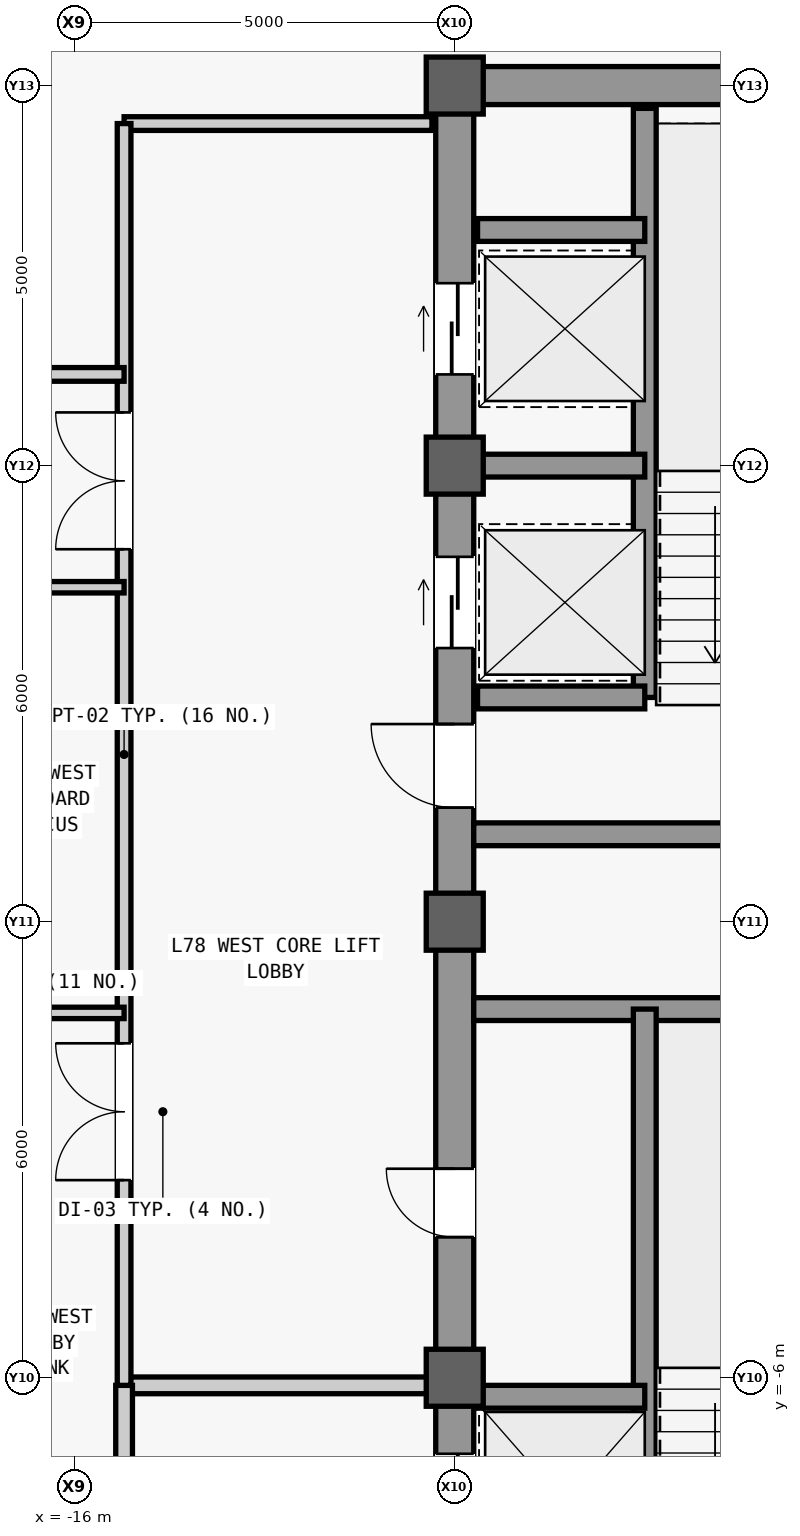
"""IFC4 building model, lengths in metres.
Left out: names, types, materials, properties, quantities, classifications, styles, units other than length and angle.
Written with IfcOpenShell. Run it as: python <this file> out.ifc"""

import sys

from ifc_helpers import new_model, si_unit, direction, frame, frame_2d, origin, origin_2d, place, context, subcontext, project, spatial, rectangle, extrude, source, transform, mapped, element, fill, save


model = new_model("IFC4")
c1 = context("Model", 3, precision=1e-05, world=origin(), true_north=direction((0.0, 1.0)))
c2 = subcontext(c1, "Body", "Model", "MODEL_VIEW")
j1 = project(units=[si_unit("LENGTHUNIT", "METRE"), si_unit("PLANEANGLEUNIT", "RADIAN")], contexts=[c1])
p1 = place(None, origin())
s1 = spatial("IfcSite", under=j1, at=p1, CompositionType="ELEMENT")
p2 = place(p1, origin())
s2 = spatial("IfcBuilding", under=s1, at=p2, CompositionType="ELEMENT")
p3 = place(p2, frame((0.0, 0.0, 330.3)))
s3 = spatial("IfcBuildingStorey", under=s2, at=p3, CompositionType="ELEMENT", Elevation=330.3)
m1 = source(origin(), c2, "Body", "SweptSolid", [
    extrude(rectangle(XDim=22.0, YDim=0.5, at=frame_2d((11.0, 0.0))), origin(), (0.0, 0.0, 1.0), 3.74),
])
p4 = place(p3, frame((-11.0, -11.0, 0.0), z_axis=(0.0, 0.0, 1.0), x_axis=(0.0, 1.0, 0.0)))
e1 = element("IfcWall", 1, at=p4, inside=s3, PredefinedType="SHEAR", context=c2, shape_type="MappedRepresentation", body=[
    mapped(m1, transform((0.0, 0.0, 0.0), scale=1.0)),
])
m2 = source(origin(), c2, "Body", "SweptSolid", [
    extrude(rectangle(XDim=1.1, YDim=2.2, at=frame_2d((0.55, 1.1))), frame((0.0, 0.26, 0.0), z_axis=(0.0, -1.0, 0.0), x_axis=(1.0, 0.0, 0.0)), (0.0, 0.0, 1.0), 0.52),
])
p5 = place(p4, frame((0.8, 0.0, 0.0)))
e2 = element("IfcOpeningElement", 2, at=p5, cuts=e1, PredefinedType="OPENING", context=c2, shape_type="MappedRepresentation", body=[
    mapped(m2, transform((0.0, 0.0, 0.0), scale=1.0)),
])
p6 = place(p4, frame((12.5, 0.0, 0.0)))
e3 = element("IfcOpeningElement", 3, at=p6, cuts=e1, PredefinedType="OPENING", context=c2, shape_type="MappedRepresentation", body=[
    mapped(m2, transform((0.0, 0.0, 0.0), scale=1.0)),
])
m3 = source(origin(), c2, "Body", "SweptSolid", [
    extrude(rectangle(XDim=0.9, YDim=2.15, at=frame_2d((0.45, 1.075))), frame((0.0, 0.26, 0.0), z_axis=(0.0, -1.0, 0.0), x_axis=(1.0, 0.0, 0.0)), (0.0, 0.0, 1.0), 0.52),
])
p7 = place(p4, frame((6.85, 0.0, 0.0)))
e4 = element("IfcOpeningElement", 4, at=p7, cuts=e1, PredefinedType="OPENING", context=c2, shape_type="MappedRepresentation", body=[
    mapped(m3, transform((0.0, 0.0, 0.0), scale=1.0)),
])
m4 = source(origin(), c2, "Body", "SweptSolid", [
    extrude(rectangle(XDim=1.2, YDim=2.3, at=frame_2d((0.6, 1.15))), frame((0.0, 0.26, 0.0), z_axis=(0.0, -1.0, 0.0), x_axis=(1.0, 0.0, 0.0)), (0.0, 0.0, 1.0), 0.52),
])
p8 = place(p4, frame((14.6, 0.0, 0.0)))
e5 = element("IfcOpeningElement", 5, at=p8, cuts=e1, PredefinedType="OPENING", context=c2, shape_type="MappedRepresentation", body=[
    mapped(m4, transform((0.0, 0.0, 0.0), scale=1.0)),
])
p9 = place(p4, frame((18.2, 0.0, 0.0)))
e6 = element("IfcOpeningElement", 6, at=p9, cuts=e1, PredefinedType="OPENING", context=c2, shape_type="MappedRepresentation", body=[
    mapped(m4, transform((0.0, 0.0, 0.0), scale=1.0)),
])
m5 = source(origin(), c2, "Body", "SweptSolid", [
    extrude(rectangle(XDim=1.3, YDim=2.3, at=frame_2d((0.65, 1.15))), frame((0.0, 0.26, 0.0), z_axis=(0.0, -1.0, 0.0), x_axis=(1.0, 0.0, 0.0)), (0.0, 0.0, 1.0), 0.52),
])
p10 = place(p4, frame((2.7, 0.0, 0.0)))
e7 = element("IfcOpeningElement", 7, at=p10, cuts=e1, PredefinedType="OPENING", context=c2, shape_type="MappedRepresentation", body=[
    mapped(m5, transform((0.0, 0.0, 0.0), scale=1.0)),
])
m6 = source(origin(), c2, "Body", "SweptSolid", [
    extrude(rectangle(XDim=5.9, YDim=0.5, at=frame_2d((2.95, 0.0))), origin(), (0.0, 0.0, 1.0), 3.74),
])
p11 = place(p3, frame((-10.75, 11.0, 0.0), z_axis=(0.0, 0.0, 1.0), x_axis=(1.0, 0.0, 0.0)))
e8 = element("IfcWall", 8, at=p11, inside=s3, PredefinedType="SHEAR", context=c2, shape_type="MappedRepresentation", body=[
    mapped(m6, transform((0.0, 0.0, 0.0), scale=1.0)),
])
m7 = source(origin(), c2, "Body", "SweptSolid", [
    extrude(rectangle(XDim=5.65, YDim=0.3, at=frame_2d((2.825, 0.0))), origin(), (0.0, 0.0, 1.0), 3.74),
])
for number, where, z_axis, x_axis in (
    (9, (-10.75, -1.15, 0.0), (0.0, 0.0, 1.0), (1.0, 0.0, 0.0)),
    (10, (-10.75, 1.15, 0.0), (0.0, 0.0, 1.0), (1.0, 0.0, 0.0)),
):
    element("IfcWall", number, at=place(p3, frame(where, z_axis=z_axis, x_axis=x_axis)), inside=s3, PredefinedType="SHEAR", context=c2, shape_type="MappedRepresentation", body=[
        mapped(m7, transform((0.0, 0.0, 0.0), scale=1.0)),
    ])
m8 = source(origin(), c2, "Body", "SweptSolid", [
    extrude(rectangle(XDim=0.75, YDim=0.75, at=origin_2d()), origin(), (0.0, 0.0, 1.0), 4.0),
])
for number, where, z_axis, x_axis in (
    (11, (-11.0, -6.0, 0.0), (0.0, 0.0, 1.0), (1.0, 0.0, 0.0)),
    (12, (-11.0, 0.0, 0.0), (0.0, 0.0, 1.0), (1.0, 0.0, 0.0)),
    (13, (-11.0, 6.0, 0.0), (0.0, 0.0, 1.0), (1.0, 0.0, 0.0)),
    (14, (-11.0, 11.0, 0.0), (0.0, 0.0, 1.0), (1.0, 0.0, 0.0)),
):
    element("IfcColumn", number, at=place(p3, frame(where, z_axis=z_axis, x_axis=x_axis)), inside=s3, PredefinedType="COLUMN", context=c2, shape_type="MappedRepresentation", body=[
        mapped(m8, transform((0.0, 0.0, 0.0), scale=1.0)),
    ])
m9 = source(origin(), c2, "Body", "SweptSolid", [
    extrude(rectangle(XDim=7.8, YDim=0.3, at=frame_2d((3.9, 0.0))), origin(), (0.0, 0.0, 1.0), 3.74),
])
p12 = place(p3, frame((-8.5, -8.95, 0.0), z_axis=(0.0, 0.0, 1.0), x_axis=(0.0, 1.0, 0.0)))
e15 = element("IfcWall", 15, at=p12, inside=s3, PredefinedType="SHEAR", context=c2, shape_type="MappedRepresentation", body=[
    mapped(m9, transform((0.0, 0.0, 0.0), scale=1.0)),
])
m10 = source(origin(), c2, "Body", "SweptSolid", [
    extrude(rectangle(XDim=2.2, YDim=0.3, at=frame_2d((1.1, 0.0))), origin(), (0.0, 0.0, 1.0), 3.74),
])
p13 = place(p3, frame((-10.7, -6.25, 0.0), z_axis=(0.0, 0.0, 1.0), x_axis=(1.0, 0.0, 0.0)))
e16 = element("IfcWall", 16, at=p13, inside=s3, PredefinedType="SHEAR", context=c2, shape_type="MappedRepresentation", body=[
    mapped(m10, transform((0.0, 0.0, 0.0), scale=1.0)),
])
m11 = source(origin(), c2, "Body", "SweptSolid", [
    extrude(rectangle(XDim=7.75, YDim=0.3, at=frame_2d((3.875, 0.0))), origin(), (0.0, 0.0, 1.0), 3.74),
])
p14 = place(p3, frame((-8.5, 2.95, 0.0), z_axis=(0.0, 0.0, 1.0), x_axis=(0.0, 1.0, 0.0)))
e17 = element("IfcWall", 17, at=p14, inside=s3, PredefinedType="SHEAR", context=c2, shape_type="MappedRepresentation", body=[
    mapped(m11, transform((0.0, 0.0, 0.0), scale=1.0)),
])
for number, where, z_axis, x_axis in (
    (18, (-10.7, 2.95, 0.0), (0.0, 0.0, 1.0), (1.0, 0.0, 0.0)),
    (19, (-10.7, 6.0, 0.0), (0.0, 0.0, 1.0), (1.0, 0.0, 0.0)),
    (20, (-10.7, 9.1, 0.0), (0.0, 0.0, 1.0), (1.0, 0.0, 0.0)),
):
    element("IfcWall", number, at=place(p3, frame(where, z_axis=z_axis, x_axis=x_axis)), inside=s3, PredefinedType="SHEAR", context=c2, shape_type="MappedRepresentation", body=[
        mapped(m10, transform((0.0, 0.0, 0.0), scale=1.0)),
    ])
m12 = source(origin(), c2, "Body", "SweptSolid", [
    extrude(rectangle(XDim=4.05, YDim=0.22, at=frame_2d((2.025, 0.0))), origin(), (0.0, 0.0, 1.0), 3.124),
])
p15 = place(p3, frame((-15.35, -6.1, 0.0), z_axis=(0.0, 0.0, 1.0), x_axis=(1.0, 0.0, 0.0)))
e21 = element("IfcWall", 21, at=p15, inside=s3, PredefinedType="PARTITIONING", context=c2, shape_type="MappedRepresentation", body=[
    mapped(m12, transform((0.0, 0.0, 0.0), scale=1.0)),
])
m13 = source(origin(), c2, "Body", "SweptSolid", [
    extrude(rectangle(XDim=4.4, YDim=0.22, at=frame_2d((2.2, 0.0))), origin(), (0.0, 0.0, 1.0), 3.74),
])
p16 = place(p3, frame((-15.35, -10.5, 0.0), z_axis=(0.0, 0.0, 1.0), x_axis=(0.0, 1.0, 0.0)))
e22 = element("IfcWall", 22, at=p16, inside=s3, PredefinedType="PARTITIONING", context=c2, shape_type="MappedRepresentation", body=[
    mapped(m13, transform((0.0, 0.0, 0.0), scale=1.0)),
])
m14 = source(origin(), c2, "Body", "SweptSolid", [
    extrude(rectangle(XDim=1.2, YDim=2.2, at=frame_2d((0.6, 1.1))), frame((0.0, 0.12, 0.0), z_axis=(0.0, -1.0, 0.0), x_axis=(1.0, 0.0, 0.0)), (0.0, 0.0, 1.0), 0.24),
])
p17 = place(p16, frame((1.6, 0.0, 0.0)))
e23 = element("IfcOpeningElement", 23, at=p17, cuts=e22, PredefinedType="OPENING", context=c2, shape_type="MappedRepresentation", body=[
    mapped(m14, transform((0.0, 0.0, 0.0), scale=1.0)),
])
m15 = source(origin(), c2, "Body", "SweptSolid", [
    extrude(rectangle(XDim=4.05, YDim=0.18, at=frame_2d((2.025, 0.0))), origin(), (0.0, 0.0, 1.0), 3.74),
])
p18 = place(p3, frame((-15.35, 10.5, 0.0), z_axis=(0.0, 0.0, 1.0), x_axis=(1.0, 0.0, 0.0)))
e24 = element("IfcWall", 24, at=p18, inside=s3, PredefinedType="PARTITIONING", context=c2, shape_type="MappedRepresentation", body=[
    mapped(m15, transform((0.0, 0.0, 0.0), scale=1.0)),
])
m16 = source(origin(), c2, "Body", "SweptSolid", [
    extrude(rectangle(XDim=16.6, YDim=0.18, at=frame_2d((8.3, 0.0))), origin(), (0.0, 0.0, 1.0), 3.74),
])
p19 = place(p3, frame((-15.35, -6.1, 0.0), z_axis=(0.0, 0.0, 1.0), x_axis=(0.0, 1.0, 0.0)))
e25 = element("IfcWall", 25, at=p19, inside=s3, PredefinedType="PARTITIONING", context=c2, shape_type="MappedRepresentation", body=[
    mapped(m16, transform((0.0, 0.0, 0.0), scale=1.0)),
])
m17 = source(origin(), c2, "Body", "SweptSolid", [
    extrude(rectangle(XDim=1.8, YDim=2.25, at=frame_2d((0.9, 1.125))), frame((0.0, 0.1, 0.0), z_axis=(0.0, -1.0, 0.0), x_axis=(1.0, 0.0, 0.0)), (0.0, 0.0, 1.0), 0.2),
])
p20 = place(p19, frame((2.7, 0.0, 0.0)))
e26 = element("IfcOpeningElement", 26, at=p20, cuts=e25, PredefinedType="OPENING", context=c2, shape_type="MappedRepresentation", body=[
    mapped(m17, transform((0.0, 0.0, 0.0), scale=1.0)),
])
p21 = place(p19, frame((11.0, 0.0, 0.0)))
e27 = element("IfcOpeningElement", 27, at=p21, cuts=e25, PredefinedType="OPENING", context=c2, shape_type="MappedRepresentation", body=[
    mapped(m17, transform((0.0, 0.0, 0.0), scale=1.0)),
])
m18 = source(origin(), c2, "Body", "SweptSolid", [
    extrude(rectangle(XDim=2.05, YDim=0.15, at=frame_2d((1.025, 0.0))), origin(), (0.0, 0.0, 1.0), 3.74),
])
for number, where, z_axis, x_axis in (
    (28, (-17.4, -1.2, 0.0), (0.0, 0.0, 1.0), (1.0, 0.0, 0.0)),
    (29, (-17.4, 4.4, 0.0), (0.0, 0.0, 1.0), (1.0, 0.0, 0.0)),
):
    element("IfcWall", number, at=place(p3, frame(where, z_axis=z_axis, x_axis=x_axis)), inside=s3, PredefinedType="PARTITIONING", context=c2, shape_type="MappedRepresentation", body=[
        mapped(m18, transform((0.0, 0.0, 0.0), scale=1.0)),
    ])
m19 = source(origin(), c2, "Body", "SweptSolid", [
    extrude(rectangle(XDim=2.05, YDim=0.18, at=frame_2d((1.025, 0.0))), origin(), (0.0, 0.0, 1.0), 3.74),
])
p22 = place(p3, frame((-17.4, 7.2, 0.0), z_axis=(0.0, 0.0, 1.0), x_axis=(1.0, 0.0, 0.0)))
e30 = element("IfcWall", 30, at=p22, inside=s3, PredefinedType="PARTITIONING", context=c2, shape_type="MappedRepresentation", body=[
    mapped(m19, transform((0.0, 0.0, 0.0), scale=1.0)),
])
m20 = source(origin(), c2, "Body", "SweptSolid", [
    extrude(rectangle(XDim=1.1, YDim=2.2, at=frame_2d((0.55, 1.1))), frame((0.0, 0.025, 0.0), z_axis=(0.0, -1.0, 0.0), x_axis=(1.0, 0.0, 0.0)), (0.0, 0.0, 1.0), 0.05),
])
p23 = place(p6, origin())
e31 = element("IfcDoor", 31, at=p23, inside=s3, OperationType="SINGLE_SWING_RIGHT", PredefinedType="DOOR", context=c2, shape_type="MappedRepresentation", body=[
    mapped(m20, transform((0.0, 0.0, 0.0), scale=1.0)),
])
fill(e3, e31)
m21 = source(origin(), c2, "Body", "SweptSolid", [
    extrude(rectangle(XDim=0.9, YDim=2.15, at=frame_2d((0.45, 1.075))), frame((0.0, 0.025, 0.0), z_axis=(0.0, -1.0, 0.0), x_axis=(1.0, 0.0, 0.0)), (0.0, 0.0, 1.0), 0.05),
])
p24 = place(p7, origin())
e32 = element("IfcDoor", 32, at=p24, inside=s3, OperationType="SINGLE_SWING_RIGHT", PredefinedType="DOOR", context=c2, shape_type="MappedRepresentation", body=[
    mapped(m21, transform((0.0, 0.0, 0.0), scale=1.0)),
])
fill(e4, e32)
m22 = source(origin(), c2, "Body", "SweptSolid", [
    extrude(rectangle(XDim=1.8, YDim=2.25, at=frame_2d((0.9, 1.125))), frame((0.0, 0.025, 0.0), z_axis=(0.0, -1.0, 0.0), x_axis=(1.0, 0.0, 0.0)), (0.0, 0.0, 1.0), 0.05),
])
p25 = place(p20, origin())
e33 = element("IfcDoor", 33, at=p25, inside=s3, OperationType="SINGLE_SWING_LEFT", PredefinedType="DOOR", context=c2, shape_type="MappedRepresentation", body=[
    mapped(m22, transform((0.0, 0.0, 0.0), scale=1.0)),
])
fill(e26, e33)
p26 = place(p21, origin())
e34 = element("IfcDoor", 34, at=p26, inside=s3, OperationType="SINGLE_SWING_RIGHT", PredefinedType="DOOR", context=c2, shape_type="MappedRepresentation", body=[
    mapped(m22, transform((0.0, 0.0, 0.0), scale=1.0)),
])
fill(e27, e34)
m23 = source(origin(), c2, "Body", "SweptSolid", [
    extrude(rectangle(XDim=1.2, YDim=2.3, at=frame_2d((0.6, 1.15))), frame((0.0, 0.025, 0.0), z_axis=(0.0, -1.0, 0.0), x_axis=(1.0, 0.0, 0.0)), (0.0, 0.0, 1.0), 0.05),
])
p27 = place(p8, origin())
e35 = element("IfcDoor", 35, at=p27, inside=s3, OperationType="SLIDING_TO_LEFT", PredefinedType="DOOR", context=c2, shape_type="MappedRepresentation", body=[
    mapped(m23, transform((0.0, 0.0, 0.0), scale=1.0)),
])
fill(e5, e35)
p28 = place(p9, origin())
e36 = element("IfcDoor", 36, at=p28, inside=s3, OperationType="SLIDING_TO_LEFT", PredefinedType="DOOR", context=c2, shape_type="MappedRepresentation", body=[
    mapped(m23, transform((0.0, 0.0, 0.0), scale=1.0)),
])
fill(e6, e36)
m24 = source(origin(), c2, "Body", "SweptSolid", [
    extrude(rectangle(XDim=1.3, YDim=2.3, at=frame_2d((0.65, 1.15))), frame((0.0, 0.025, 0.0), z_axis=(0.0, -1.0, 0.0), x_axis=(1.0, 0.0, 0.0)), (0.0, 0.0, 1.0), 0.05),
])
p29 = place(p10, origin())
e37 = element("IfcDoor", 37, at=p29, inside=s3, OperationType="SLIDING_TO_LEFT", PredefinedType="DOOR", context=c2, shape_type="MappedRepresentation", body=[
    mapped(m24, transform((0.0, 0.0, 0.0), scale=1.0)),
])
fill(e7, e37)
save(model, sys.argv[1])
